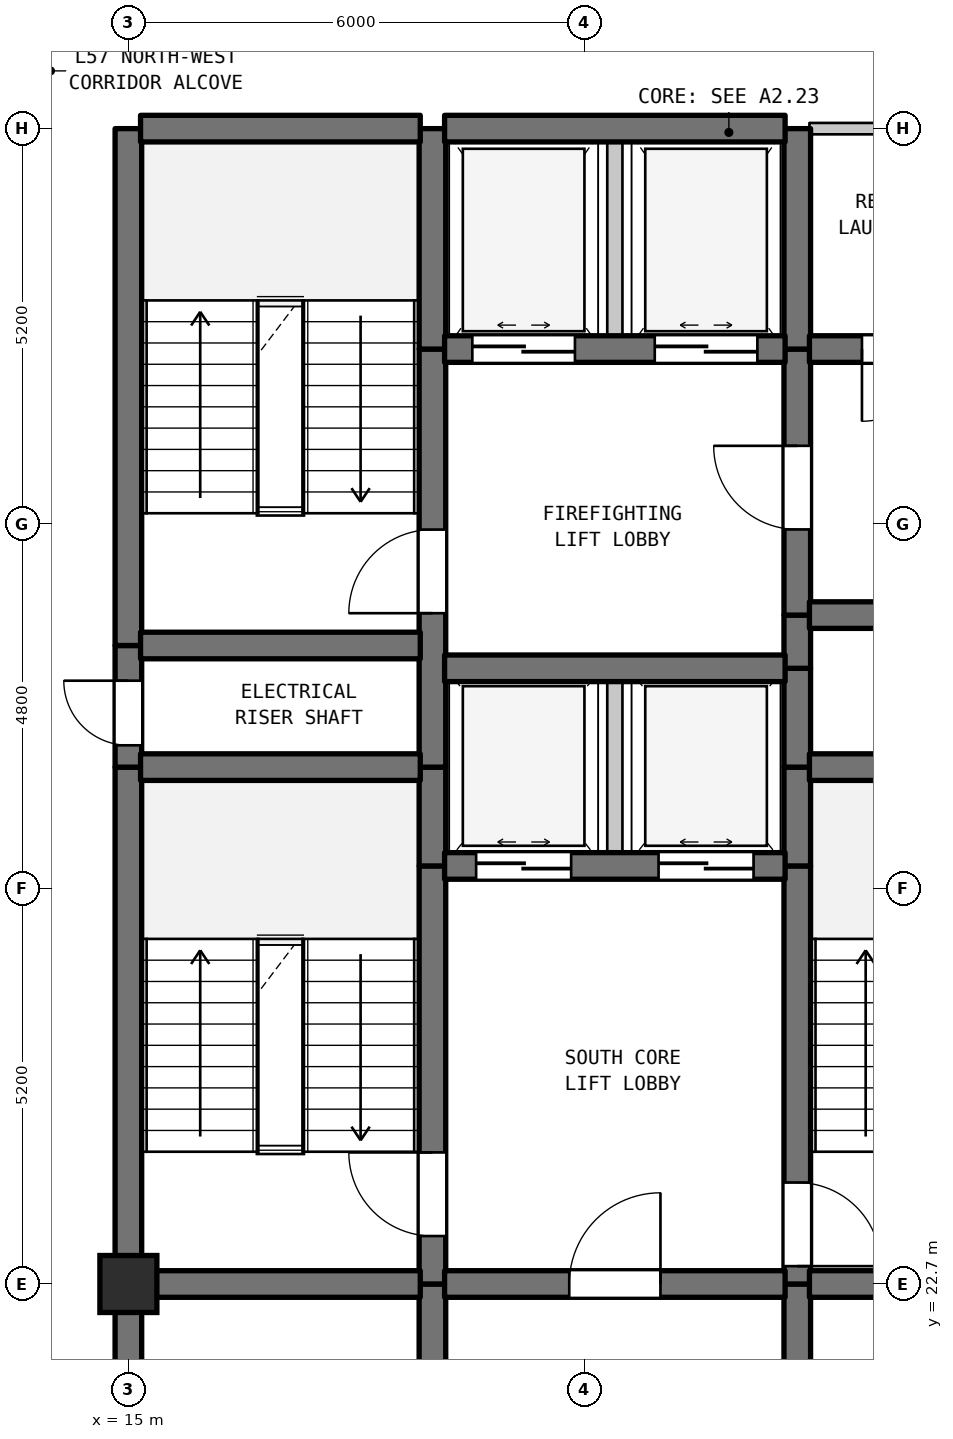
"""IFC4 building model, lengths in metres.
Left out: names, types, materials, properties, quantities, classifications, styles, units other than length and angle.
Written with IfcOpenShell. Run it as: python <this file> out.ifc"""

import sys

from ifc_helpers import new_model, si_unit, direction, frame, frame_2d, origin, origin_2d, place, context, subcontext, project, spatial, rectangle, extrude, element, fill, save


model = new_model("IFC4")
c1 = context("Model", 3, precision=1e-05, world=origin(), true_north=direction((0.0, 1.0)))
c2 = subcontext(c1, "Body", "Model", "MODEL_VIEW")
j1 = project(units=[si_unit("LENGTHUNIT", "METRE"), si_unit("PLANEANGLEUNIT", "RADIAN")], contexts=[c1])
p1 = place(None, origin())
s1 = spatial("IfcSite", under=j1, at=p1, CompositionType="ELEMENT")
p2 = place(p1, origin())
s2 = spatial("IfcBuilding", under=s1, at=p2, CompositionType="ELEMENT")
p3 = place(p2, frame((0.0, 0.0, 230.2)))
s3 = spatial("IfcBuildingStorey", under=s2, at=p3, CompositionType="ELEMENT", Elevation=230.2)
p4 = place(p3, frame((15.0, 22.7, 0.0), z_axis=(0.0, 0.0, 1.0), x_axis=(1.0, 0.0, 0.0)))
e1 = element("IfcColumn", 1, at=p4, inside=s3, PredefinedType="COLUMN", context=c2, shape_type="SweptSolid", body=[
    extrude(rectangle(XDim=0.75, YDim=0.75, at=origin_2d()), origin(), (0.0, 0.0, 1.0), 3.7),
])
p5 = place(p3, frame((15.0, 19.5, 0.0), z_axis=(0.0, 0.0, 1.0), x_axis=(0.0, 1.0, 0.0)))
e2 = element("IfcWall", 2, at=p5, inside=s3, PredefinedType="SHEAR", context=c2, shape_type="SweptSolid", body=[
    extrude(rectangle(XDim=3.2, YDim=0.35, at=frame_2d((1.6, 0.0))), origin(), (0.0, 0.0, 1.0), 3.39),
])
p6 = place(p3, frame((15.0, 22.7, 0.0), z_axis=(0.0, 0.0, 1.0), x_axis=(0.0, 1.0, 0.0)))
e3 = element("IfcWall", 3, at=p6, inside=s3, PredefinedType="SHEAR", context=c2, shape_type="SweptSolid", body=[
    extrude(rectangle(XDim=6.8, YDim=0.35, at=frame_2d((3.4, 0.0))), origin(), (0.0, 0.0, 1.0), 3.39),
])
p7 = place(p3, frame((15.0, 29.5, 0.0), z_axis=(0.0, 0.0, 1.0), x_axis=(0.0, 1.0, 0.0)))
e4 = element("IfcWall", 4, at=p7, inside=s3, PredefinedType="SHEAR", context=c2, shape_type="SweptSolid", body=[
    extrude(rectangle(XDim=1.6, YDim=0.35, at=frame_2d((0.8, 0.0))), origin(), (0.0, 0.0, 1.0), 3.39),
])
p8 = place(p7, frame((0.287, 0.0, 0.0)))
e5 = element("IfcOpeningElement", 5, at=p8, cuts=e4, PredefinedType="OPENING", context=c2, shape_type="SweptSolid", body=[
    extrude(rectangle(XDim=0.85, YDim=2.1, at=frame_2d((0.425, 1.05))), frame((0.0, 0.185, 0.0), z_axis=(0.0, -1.0, 0.0), x_axis=(1.0, 0.0, 0.0)), (0.0, 0.0, 1.0), 0.37),
])
p9 = place(p3, frame((15.0, 31.1, 0.0), z_axis=(0.0, 0.0, 1.0), x_axis=(0.0, 1.0, 0.0)))
e6 = element("IfcWall", 6, at=p9, inside=s3, PredefinedType="SHEAR", context=c2, shape_type="SweptSolid", body=[
    extrude(rectangle(XDim=6.8, YDim=0.35, at=frame_2d((3.4, 0.0))), origin(), (0.0, 0.0, 1.0), 3.39),
])
p10 = place(p3, frame((19.0, 19.5, 0.0), z_axis=(0.0, 0.0, 1.0), x_axis=(0.0, 1.0, 0.0)))
e7 = element("IfcWall", 7, at=p10, inside=s3, PredefinedType="SHEAR", context=c2, shape_type="SweptSolid", body=[
    extrude(rectangle(XDim=3.2, YDim=0.35, at=frame_2d((1.6, 0.0))), origin(), (0.0, 0.0, 1.0), 3.39),
])
p11 = place(p3, frame((19.0, 22.7, 0.0), z_axis=(0.0, 0.0, 1.0), x_axis=(0.0, 1.0, 0.0)))
e8 = element("IfcWall", 8, at=p11, inside=s3, PredefinedType="SHEAR", context=c2, shape_type="SweptSolid", body=[
    extrude(rectangle(XDim=5.5, YDim=0.35, at=frame_2d((2.75, 0.0))), origin(), (0.0, 0.0, 1.0), 3.39),
])
p12 = place(p11, frame((0.631, 0.0, 0.0)))
e9 = element("IfcOpeningElement", 9, at=p12, cuts=e8, PredefinedType="OPENING", context=c2, shape_type="SweptSolid", body=[
    extrude(rectangle(XDim=1.1, YDim=2.15, at=frame_2d((0.55, 1.075))), frame((0.0, 0.185, 0.0), z_axis=(0.0, -1.0, 0.0), x_axis=(1.0, 0.0, 0.0)), (0.0, 0.0, 1.0), 0.37),
])
p13 = place(p3, frame((19.0, 28.2, 0.0), z_axis=(0.0, 0.0, 1.0), x_axis=(0.0, 1.0, 0.0)))
e10 = element("IfcWall", 10, at=p13, inside=s3, PredefinedType="SHEAR", context=c2, shape_type="SweptSolid", body=[
    extrude(rectangle(XDim=1.3, YDim=0.35, at=frame_2d((0.65, 0.0))), origin(), (0.0, 0.0, 1.0), 3.39),
])
p14 = place(p3, frame((19.0, 29.5, 0.0), z_axis=(0.0, 0.0, 1.0), x_axis=(0.0, 1.0, 0.0)))
e11 = element("IfcWall", 11, at=p14, inside=s3, PredefinedType="SHEAR", context=c2, shape_type="SweptSolid", body=[
    extrude(rectangle(XDim=5.5, YDim=0.35, at=frame_2d((2.75, 0.0))), origin(), (0.0, 0.0, 1.0), 3.39),
])
p15 = place(p14, frame((2.025, 0.0, 0.0)))
e12 = element("IfcOpeningElement", 12, at=p15, cuts=e11, PredefinedType="OPENING", context=c2, shape_type="SweptSolid", body=[
    extrude(rectangle(XDim=1.1, YDim=2.15, at=frame_2d((0.55, 1.075))), frame((0.0, 0.185, 0.0), z_axis=(0.0, -1.0, 0.0), x_axis=(1.0, 0.0, 0.0)), (0.0, 0.0, 1.0), 0.37),
])
p16 = place(p3, frame((19.0, 35.0, 0.0), z_axis=(0.0, 0.0, 1.0), x_axis=(0.0, 1.0, 0.0)))
e13 = element("IfcWall", 13, at=p16, inside=s3, PredefinedType="SHEAR", context=c2, shape_type="SweptSolid", body=[
    extrude(rectangle(XDim=2.9, YDim=0.35, at=frame_2d((1.45, 0.0))), origin(), (0.0, 0.0, 1.0), 3.39),
])
p17 = place(p3, frame((21.4, 28.2, 0.0), z_axis=(0.0, 0.0, 1.0), x_axis=(0.0, 1.0, 0.0)))
e14 = element("IfcWall", 14, at=p17, inside=s3, PredefinedType="STANDARD", context=c2, shape_type="SweptSolid", body=[
    extrude(rectangle(XDim=2.6, YDim=0.2, at=frame_2d((1.3, 0.0))), origin(), (0.0, 0.0, 1.0), 3.39),
])
p18 = place(p3, frame((21.4, 35.0, 0.0), z_axis=(0.0, 0.0, 1.0), x_axis=(0.0, 1.0, 0.0)))
e15 = element("IfcWall", 15, at=p18, inside=s3, PredefinedType="STANDARD", context=c2, shape_type="SweptSolid", body=[
    extrude(rectangle(XDim=2.9, YDim=0.2, at=frame_2d((1.45, 0.0))), origin(), (0.0, 0.0, 1.0), 3.39),
])
p19 = place(p3, frame((23.8, 19.5, 0.0), z_axis=(0.0, 0.0, 1.0), x_axis=(0.0, 1.0, 0.0)))
e16 = element("IfcWall", 16, at=p19, inside=s3, PredefinedType="SHEAR", context=c2, shape_type="SweptSolid", body=[
    extrude(rectangle(XDim=3.2, YDim=0.35, at=frame_2d((1.6, 0.0))), origin(), (0.0, 0.0, 1.0), 3.39),
])
p20 = place(p3, frame((23.8, 22.7, 0.0), z_axis=(0.0, 0.0, 1.0), x_axis=(0.0, 1.0, 0.0)))
e17 = element("IfcWall", 17, at=p20, inside=s3, PredefinedType="SHEAR", context=c2, shape_type="SweptSolid", body=[
    extrude(rectangle(XDim=5.5, YDim=0.35, at=frame_2d((2.75, 0.0))), origin(), (0.0, 0.0, 1.0), 3.39),
])
p21 = place(p20, frame((0.235, 0.0, 0.0)))
e18 = element("IfcOpeningElement", 18, at=p21, cuts=e17, PredefinedType="OPENING", context=c2, shape_type="SweptSolid", body=[
    extrude(rectangle(XDim=1.1, YDim=2.15, at=frame_2d((0.55, 1.075))), frame((0.0, 0.185, 0.0), z_axis=(0.0, -1.0, 0.0), x_axis=(1.0, 0.0, 0.0)), (0.0, 0.0, 1.0), 0.37),
])
for number, where, z_axis, x_axis in (
    (19, (23.8, 28.2, 0.0), (0.0, 0.0, 1.0), (0.0, 1.0, 0.0)),
    (20, (23.8, 29.5, 0.0), (0.0, 0.0, 1.0), (0.0, 1.0, 0.0)),
):
    element("IfcWall", number, at=place(p3, frame(where, z_axis=z_axis, x_axis=x_axis)), inside=s3, PredefinedType="SHEAR", context=c2, shape_type="SweptSolid", body=[
        extrude(rectangle(XDim=1.3, YDim=0.35, at=frame_2d((0.65, 0.0))), origin(), (0.0, 0.0, 1.0), 3.39),
    ])
p22 = place(p3, frame((23.8, 30.8, 0.0), z_axis=(0.0, 0.0, 1.0), x_axis=(0.0, 1.0, 0.0)))
e21 = element("IfcWall", 21, at=p22, inside=s3, PredefinedType="SHEAR", context=c2, shape_type="SweptSolid", body=[
    extrude(rectangle(XDim=0.7, YDim=0.35, at=frame_2d((0.35, 0.0))), origin(), (0.0, 0.0, 1.0), 3.39),
])
p23 = place(p3, frame((23.8, 31.5, 0.0), z_axis=(0.0, 0.0, 1.0), x_axis=(0.0, 1.0, 0.0)))
e22 = element("IfcWall", 22, at=p23, inside=s3, PredefinedType="SHEAR", context=c2, shape_type="SweptSolid", body=[
    extrude(rectangle(XDim=3.5, YDim=0.35, at=frame_2d((1.75, 0.0))), origin(), (0.0, 0.0, 1.0), 3.39),
])
p24 = place(p23, frame((1.127, 0.0, 0.0)))
e23 = element("IfcOpeningElement", 23, at=p24, cuts=e22, PredefinedType="OPENING", context=c2, shape_type="SweptSolid", body=[
    extrude(rectangle(XDim=1.1, YDim=2.15, at=frame_2d((0.55, 1.075))), frame((0.0, 0.185, 0.0), z_axis=(0.0, -1.0, 0.0), x_axis=(1.0, 0.0, 0.0)), (0.0, 0.0, 1.0), 0.37),
])
p25 = place(p3, frame((23.8, 35.0, 0.0), z_axis=(0.0, 0.0, 1.0), x_axis=(0.0, 1.0, 0.0)))
e24 = element("IfcWall", 24, at=p25, inside=s3, PredefinedType="SHEAR", context=c2, shape_type="SweptSolid", body=[
    extrude(rectangle(XDim=2.9, YDim=0.35, at=frame_2d((1.45, 0.0))), origin(), (0.0, 0.0, 1.0), 3.39),
])
p26 = place(p3, frame((15.16, 22.7, 0.0), z_axis=(0.0, 0.0, 1.0), x_axis=(1.0, 0.0, 0.0)))
e25 = element("IfcWall", 25, at=p26, inside=s3, PredefinedType="SHEAR", context=c2, shape_type="SweptSolid", body=[
    extrude(rectangle(XDim=3.68, YDim=0.35, at=frame_2d((1.84, 0.0))), origin(), (0.0, 0.0, 1.0), 3.39),
])
p27 = place(p3, frame((19.16, 22.7, 0.0), z_axis=(0.0, 0.0, 1.0), x_axis=(1.0, 0.0, 0.0)))
e26 = element("IfcWall", 26, at=p27, inside=s3, PredefinedType="SHEAR", context=c2, shape_type="SweptSolid", body=[
    extrude(rectangle(XDim=4.48, YDim=0.35, at=frame_2d((2.24, 0.0))), origin(), (0.0, 0.0, 1.0), 3.39),
])
p28 = place(p27, frame((1.64, 0.0, 0.0)))
e27 = element("IfcOpeningElement", 27, at=p28, cuts=e26, PredefinedType="OPENING", context=c2, shape_type="SweptSolid", body=[
    extrude(rectangle(XDim=1.2, YDim=2.2, at=frame_2d((0.6, 1.1))), frame((0.0, 0.185, 0.0), z_axis=(0.0, -1.0, 0.0), x_axis=(1.0, 0.0, 0.0)), (0.0, 0.0, 1.0), 0.37),
])
p29 = place(p3, frame((23.96, 22.7, 0.0), z_axis=(0.0, 0.0, 1.0), x_axis=(1.0, 0.0, 0.0)))
e28 = element("IfcWall", 28, at=p29, inside=s3, PredefinedType="SHEAR", context=c2, shape_type="SweptSolid", body=[
    extrude(rectangle(XDim=3.155, YDim=0.35, at=frame_2d((1.578, 0.0))), origin(), (0.0, 0.0, 1.0), 3.39),
])
p30 = place(p3, frame((19.16, 28.2, 0.0), z_axis=(0.0, 0.0, 1.0), x_axis=(1.0, 0.0, 0.0)))
e29 = element("IfcWall", 29, at=p30, inside=s3, PredefinedType="SHEAR", context=c2, shape_type="SweptSolid", body=[
    extrude(rectangle(XDim=4.48, YDim=0.35, at=frame_2d((2.24, 0.0))), origin(), (0.0, 0.0, 1.0), 3.39),
])
p31 = place(p30, frame((0.415, 0.0, 0.0)))
e30 = element("IfcOpeningElement", 30, at=p31, cuts=e29, PredefinedType="OPENING", context=c2, shape_type="SweptSolid", body=[
    extrude(rectangle(XDim=1.25, YDim=2.2, at=frame_2d((0.625, 1.1))), frame((0.0, 0.185, 0.0), z_axis=(0.0, -1.0, 0.0), x_axis=(1.0, 0.0, 0.0)), (0.0, 0.0, 1.0), 0.37),
])
p32 = place(p30, frame((2.815, 0.0, 0.0)))
e31 = element("IfcOpeningElement", 31, at=p32, cuts=e29, PredefinedType="OPENING", context=c2, shape_type="SweptSolid", body=[
    extrude(rectangle(XDim=1.25, YDim=2.2, at=frame_2d((0.625, 1.1))), frame((0.0, 0.185, 0.0), z_axis=(0.0, -1.0, 0.0), x_axis=(1.0, 0.0, 0.0)), (0.0, 0.0, 1.0), 0.37),
])
p33 = place(p3, frame((15.16, 29.5, 0.0), z_axis=(0.0, 0.0, 1.0), x_axis=(1.0, 0.0, 0.0)))
e32 = element("IfcWall", 32, at=p33, inside=s3, PredefinedType="SHEAR", context=c2, shape_type="SweptSolid", body=[
    extrude(rectangle(XDim=3.68, YDim=0.35, at=frame_2d((1.84, 0.0))), origin(), (0.0, 0.0, 1.0), 3.39),
])
p34 = place(p3, frame((23.96, 29.5, 0.0), z_axis=(0.0, 0.0, 1.0), x_axis=(1.0, 0.0, 0.0)))
e33 = element("IfcWall", 33, at=p34, inside=s3, PredefinedType="SHEAR", context=c2, shape_type="SweptSolid", body=[
    extrude(rectangle(XDim=3.18, YDim=0.35, at=frame_2d((1.59, 0.0))), origin(), (0.0, 0.0, 1.0), 3.39),
])
p35 = place(p3, frame((19.16, 30.8, 0.0), z_axis=(0.0, 0.0, 1.0), x_axis=(1.0, 0.0, 0.0)))
e34 = element("IfcWall", 34, at=p35, inside=s3, PredefinedType="SHEAR", context=c2, shape_type="SweptSolid", body=[
    extrude(rectangle(XDim=4.48, YDim=0.35, at=frame_2d((2.24, 0.0))), origin(), (0.0, 0.0, 1.0), 3.39),
])
p36 = place(p3, frame((15.16, 31.1, 0.0), z_axis=(0.0, 0.0, 1.0), x_axis=(1.0, 0.0, 0.0)))
e35 = element("IfcWall", 35, at=p36, inside=s3, PredefinedType="SHEAR", context=c2, shape_type="SweptSolid", body=[
    extrude(rectangle(XDim=3.68, YDim=0.35, at=frame_2d((1.84, 0.0))), origin(), (0.0, 0.0, 1.0), 3.39),
])
p37 = place(p3, frame((23.96, 31.5, 0.0), z_axis=(0.0, 0.0, 1.0), x_axis=(1.0, 0.0, 0.0)))
e36 = element("IfcWall", 36, at=p37, inside=s3, PredefinedType="SHEAR", context=c2, shape_type="SweptSolid", body=[
    extrude(rectangle(XDim=3.18, YDim=0.35, at=frame_2d((1.59, 0.0))), origin(), (0.0, 0.0, 1.0), 3.39),
])
p38 = place(p37, frame((1.094, 0.0, 0.0)))
e37 = element("IfcOpeningElement", 37, at=p38, cuts=e36, PredefinedType="OPENING", context=c2, shape_type="SweptSolid", body=[
    extrude(rectangle(XDim=0.85, YDim=2.1, at=frame_2d((0.425, 1.05))), frame((0.0, 0.185, 0.0), z_axis=(0.0, -1.0, 0.0), x_axis=(1.0, 0.0, 0.0)), (0.0, 0.0, 1.0), 0.37),
])
p39 = place(p3, frame((19.16, 35.0, 0.0), z_axis=(0.0, 0.0, 1.0), x_axis=(1.0, 0.0, 0.0)))
e38 = element("IfcWall", 38, at=p39, inside=s3, PredefinedType="SHEAR", context=c2, shape_type="SweptSolid", body=[
    extrude(rectangle(XDim=4.48, YDim=0.35, at=frame_2d((2.24, 0.0))), origin(), (0.0, 0.0, 1.0), 3.39),
])
p40 = place(p39, frame((0.365, 0.0, 0.0)))
e39 = element("IfcOpeningElement", 39, at=p40, cuts=e38, PredefinedType="OPENING", context=c2, shape_type="SweptSolid", body=[
    extrude(rectangle(XDim=1.35, YDim=2.2, at=frame_2d((0.675, 1.1))), frame((0.0, 0.185, 0.0), z_axis=(0.0, -1.0, 0.0), x_axis=(1.0, 0.0, 0.0)), (0.0, 0.0, 1.0), 0.37),
])
p41 = place(p39, frame((2.765, 0.0, 0.0)))
e40 = element("IfcOpeningElement", 40, at=p41, cuts=e38, PredefinedType="OPENING", context=c2, shape_type="SweptSolid", body=[
    extrude(rectangle(XDim=1.35, YDim=2.2, at=frame_2d((0.675, 1.1))), frame((0.0, 0.185, 0.0), z_axis=(0.0, -1.0, 0.0), x_axis=(1.0, 0.0, 0.0)), (0.0, 0.0, 1.0), 0.37),
])
p42 = place(p3, frame((23.96, 35.0, 0.0), z_axis=(0.0, 0.0, 1.0), x_axis=(1.0, 0.0, 0.0)))
e41 = element("IfcWall", 41, at=p42, inside=s3, PredefinedType="SHEAR", context=c2, shape_type="SweptSolid", body=[
    extrude(rectangle(XDim=2.595, YDim=0.35, at=frame_2d((1.297, 0.0))), origin(), (0.0, 0.0, 1.0), 3.39),
])
p43 = place(p42, frame((0.691, 0.0, 0.0)))
e42 = element("IfcOpeningElement", 42, at=p43, cuts=e41, PredefinedType="OPENING", context=c2, shape_type="SweptSolid", body=[
    extrude(rectangle(XDim=0.95, YDim=2.15, at=frame_2d((0.475, 1.075))), frame((0.0, 0.185, 0.0), z_axis=(0.0, -1.0, 0.0), x_axis=(1.0, 0.0, 0.0)), (0.0, 0.0, 1.0), 0.37),
])
p44 = place(p3, frame((15.16, 37.9, 0.0), z_axis=(0.0, 0.0, 1.0), x_axis=(1.0, 0.0, 0.0)))
e43 = element("IfcWall", 43, at=p44, inside=s3, PredefinedType="SHEAR", context=c2, shape_type="SweptSolid", body=[
    extrude(rectangle(XDim=3.68, YDim=0.35, at=frame_2d((1.84, 0.0))), origin(), (0.0, 0.0, 1.0), 3.39),
])
p45 = place(p3, frame((19.16, 37.9, 0.0), z_axis=(0.0, 0.0, 1.0), x_axis=(1.0, 0.0, 0.0)))
e44 = element("IfcWall", 44, at=p45, inside=s3, PredefinedType="SHEAR", context=c2, shape_type="SweptSolid", body=[
    extrude(rectangle(XDim=4.48, YDim=0.35, at=frame_2d((2.24, 0.0))), origin(), (0.0, 0.0, 1.0), 3.39),
])
p46 = place(p3, frame((23.96, 37.9, 0.0), z_axis=(0.0, 0.0, 1.0), x_axis=(1.0, 0.0, 0.0)))
e45 = element("IfcWall", 45, at=p46, inside=s3, PredefinedType="STANDARD", context=c2, shape_type="SweptSolid", body=[
    extrude(rectangle(XDim=2.595, YDim=0.15, at=frame_2d((1.297, 0.0))), origin(), (0.0, 0.0, 1.0), 2.89),
])
p47 = place(p8, origin())
e46 = element("IfcDoor", 46, at=p47, inside=s3, OperationType="SINGLE_SWING_RIGHT", PredefinedType="DOOR", context=c2, shape_type="SweptSolid", body=[
    extrude(rectangle(XDim=0.85, YDim=2.1, at=frame_2d((0.425, 1.05))), frame((0.0, 0.025, 0.0), z_axis=(0.0, -1.0, 0.0), x_axis=(1.0, 0.0, 0.0)), (0.0, 0.0, 1.0), 0.05),
])
fill(e5, e46)
p48 = place(p12, origin())
e47 = element("IfcDoor", 47, at=p48, inside=s3, OperationType="SINGLE_SWING_RIGHT", PredefinedType="DOOR", context=c2, shape_type="SweptSolid", body=[
    extrude(rectangle(XDim=1.1, YDim=2.15, at=frame_2d((0.55, 1.075))), frame((0.0, 0.025, 0.0), z_axis=(0.0, -1.0, 0.0), x_axis=(1.0, 0.0, 0.0)), (0.0, 0.0, 1.0), 0.05),
])
fill(e9, e47)
p49 = place(p15, origin())
e48 = element("IfcDoor", 48, at=p49, inside=s3, OperationType="SINGLE_SWING_LEFT", PredefinedType="DOOR", context=c2, shape_type="SweptSolid", body=[
    extrude(rectangle(XDim=1.1, YDim=2.15, at=frame_2d((0.55, 1.075))), frame((0.0, 0.025, 0.0), z_axis=(0.0, -1.0, 0.0), x_axis=(1.0, 0.0, 0.0)), (0.0, 0.0, 1.0), 0.05),
])
fill(e12, e48)
p50 = place(p21, frame((1.1, 0.0, 0.0), z_axis=(0.0, 0.0, 1.0), x_axis=(-1.0, 0.0, 0.0)))
e49 = element("IfcDoor", 49, at=p50, inside=s3, OperationType="SINGLE_SWING_LEFT", PredefinedType="DOOR", context=c2, shape_type="SweptSolid", body=[
    extrude(rectangle(XDim=1.1, YDim=2.15, at=frame_2d((0.55, 1.075))), frame((0.0, 0.025, 0.0), z_axis=(0.0, -1.0, 0.0), x_axis=(1.0, 0.0, 0.0)), (0.0, 0.0, 1.0), 0.05),
])
fill(e18, e49)
p51 = place(p24, origin())
e50 = element("IfcDoor", 50, at=p51, inside=s3, OperationType="SINGLE_SWING_RIGHT", PredefinedType="DOOR", context=c2, shape_type="SweptSolid", body=[
    extrude(rectangle(XDim=1.1, YDim=2.15, at=frame_2d((0.55, 1.075))), frame((0.0, 0.025, 0.0), z_axis=(0.0, -1.0, 0.0), x_axis=(1.0, 0.0, 0.0)), (0.0, 0.0, 1.0), 0.05),
])
fill(e23, e50)
p52 = place(p28, origin())
e51 = element("IfcDoor", 51, at=p52, inside=s3, OperationType="SINGLE_SWING_RIGHT", PredefinedType="DOOR", context=c2, shape_type="SweptSolid", body=[
    extrude(rectangle(XDim=1.2, YDim=2.2, at=frame_2d((0.6, 1.1))), frame((0.0, 0.025, 0.0), z_axis=(0.0, -1.0, 0.0), x_axis=(1.0, 0.0, 0.0)), (0.0, 0.0, 1.0), 0.05),
])
fill(e27, e51)
p53 = place(p31, origin())
e52 = element("IfcDoor", 52, at=p53, inside=s3, OperationType="DOUBLE_DOOR_SLIDING", PredefinedType="DOOR", context=c2, shape_type="SweptSolid", body=[
    extrude(rectangle(XDim=1.25, YDim=2.2, at=frame_2d((0.625, 1.1))), frame((0.0, 0.025, 0.0), z_axis=(0.0, -1.0, 0.0), x_axis=(1.0, 0.0, 0.0)), (0.0, 0.0, 1.0), 0.05),
])
fill(e30, e52)
p54 = place(p32, origin())
e53 = element("IfcDoor", 53, at=p54, inside=s3, OperationType="DOUBLE_DOOR_SLIDING", PredefinedType="DOOR", context=c2, shape_type="SweptSolid", body=[
    extrude(rectangle(XDim=1.25, YDim=2.2, at=frame_2d((0.625, 1.1))), frame((0.0, 0.025, 0.0), z_axis=(0.0, -1.0, 0.0), x_axis=(1.0, 0.0, 0.0)), (0.0, 0.0, 1.0), 0.05),
])
fill(e31, e53)
p55 = place(p40, origin())
e54 = element("IfcDoor", 54, at=p55, inside=s3, OperationType="DOUBLE_DOOR_SLIDING", PredefinedType="DOOR", context=c2, shape_type="SweptSolid", body=[
    extrude(rectangle(XDim=1.35, YDim=2.2, at=frame_2d((0.675, 1.1))), frame((0.0, 0.025, 0.0), z_axis=(0.0, -1.0, 0.0), x_axis=(1.0, 0.0, 0.0)), (0.0, 0.0, 1.0), 0.05),
])
fill(e39, e54)
p56 = place(p41, origin())
e55 = element("IfcDoor", 55, at=p56, inside=s3, OperationType="DOUBLE_DOOR_SLIDING", PredefinedType="DOOR", context=c2, shape_type="SweptSolid", body=[
    extrude(rectangle(XDim=1.35, YDim=2.2, at=frame_2d((0.675, 1.1))), frame((0.0, 0.025, 0.0), z_axis=(0.0, -1.0, 0.0), x_axis=(1.0, 0.0, 0.0)), (0.0, 0.0, 1.0), 0.05),
])
fill(e40, e55)
p57 = place(p43, frame((0.95, 0.0, 0.0), z_axis=(0.0, 0.0, 1.0), x_axis=(-1.0, 0.0, 0.0)))
e56 = element("IfcDoor", 56, at=p57, inside=s3, OperationType="SINGLE_SWING_LEFT", PredefinedType="DOOR", context=c2, shape_type="SweptSolid", body=[
    extrude(rectangle(XDim=0.95, YDim=2.15, at=frame_2d((0.475, 1.075))), frame((0.0, 0.025, 0.0), z_axis=(0.0, -1.0, 0.0), x_axis=(1.0, 0.0, 0.0)), (0.0, 0.0, 1.0), 0.05),
])
fill(e42, e56)
save(model, sys.argv[1])
